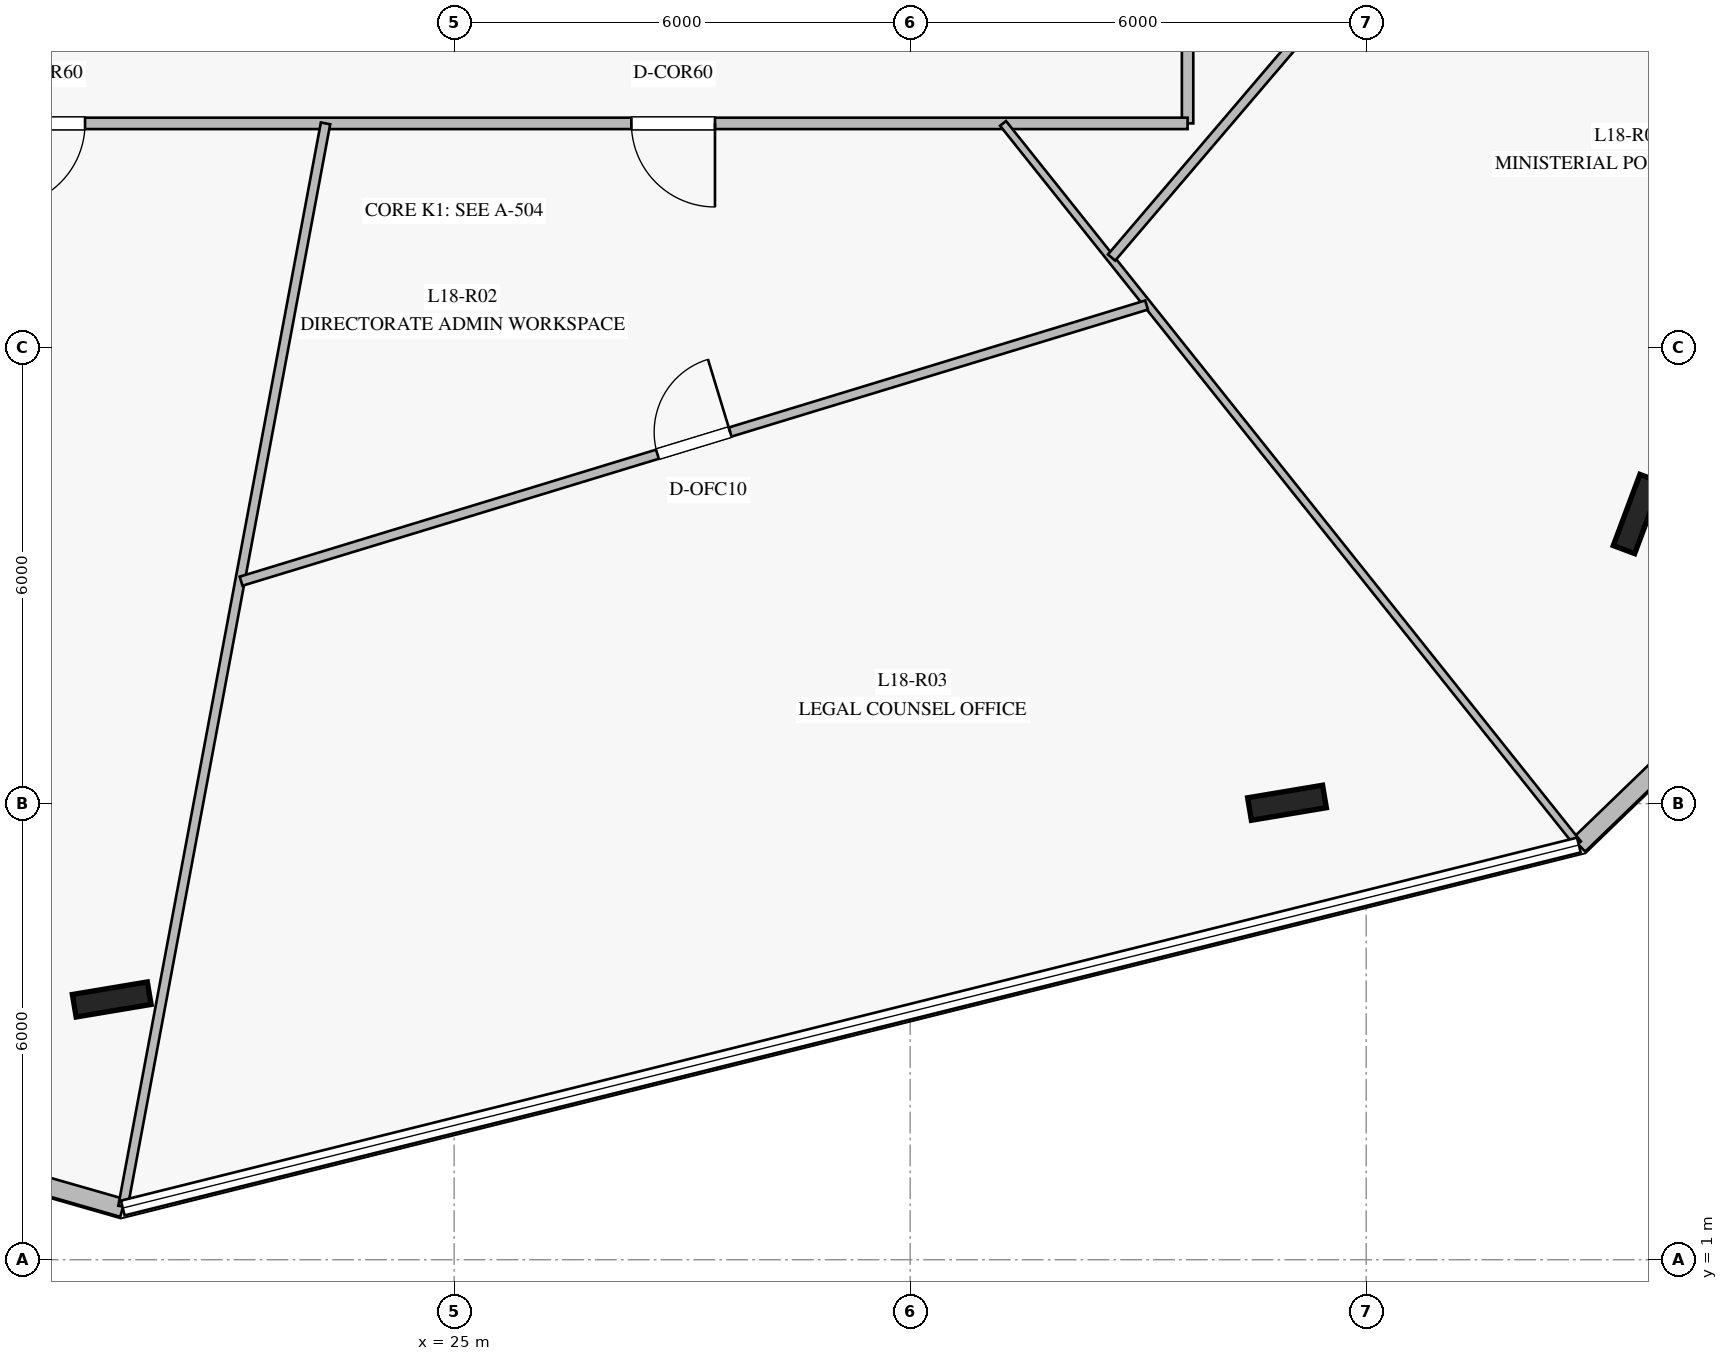
"""IFC4 building model, lengths in metres.
Left out: names, types, materials, properties, quantities, classifications, styles, units other than length and angle.
Written with IfcOpenShell. Run it as: python <this file> out.ifc"""

import sys

from ifc_helpers import new_model, si_unit, direction, frame, frame_2d, origin, origin_2d, place, context, subcontext, project, spatial, rectangle, i_section, extrude, element, fill, save


model = new_model("IFC4")
c1 = context("Model", 3, precision=1e-05, world=origin(), true_north=direction((0.0, 1.0)))
c2 = subcontext(c1, "Body", "Model", "MODEL_VIEW")
j1 = project(units=[si_unit("LENGTHUNIT", "METRE"), si_unit("PLANEANGLEUNIT", "RADIAN")], contexts=[c1])
p1 = place(None, origin())
s1 = spatial("IfcSite", under=j1, at=p1, CompositionType="ELEMENT")
p2 = place(p1, origin())
s2 = spatial("IfcBuilding", under=s1, at=p2, CompositionType="ELEMENT")
p3 = place(p2, frame((0.0, 0.0, 76.0)))
s3 = spatial("IfcBuildingStorey", under=s2, at=p3, CompositionType="ELEMENT", Elevation=76.0)
for number, where, z_axis, x_axis in (
    (1, (20.495, 4.424, 0.0), (0.0, 0.0, 1.0), (0.986, 0.165, 0.0)),
    (2, (35.958, 7.012, 0.0), (0.0, 0.0, 1.0), (0.986, 0.165, 0.0)),
    (3, (40.567, 10.811, 0.0), (0.0, 0.0, 1.0), (0.35, 0.937, 0.0)),
):
    element("IfcColumn", number, at=place(p3, frame(where, z_axis=z_axis, x_axis=x_axis)), inside=s3, PredefinedType="COLUMN", context=c2, shape_type="SweptSolid", body=[
        extrude(i_section(OverallWidth=0.3, OverallDepth=1.0, WebThickness=0.019, FlangeThickness=0.036, at=origin_2d()), origin(), (0.0, 0.0, 1.0), 4.0),
    ])
p4 = place(p3, frame((16.34, 2.913, 0.0), z_axis=(0.0, 0.0, 1.0), x_axis=(0.96124954367, -0.275679732289, 0.0)))
e4 = element("IfcWall", 4, at=p4, inside=s3, PredefinedType="STANDARD", context=c2, shape_type="SweptSolid", body=[
    extrude(rectangle(XDim=4.473, YDim=0.24, at=frame_2d((2.237, 0.0))), origin(), (0.0, 0.0, 1.0), 3.76),
])
p5 = place(p3, frame((39.798, 6.456, 0.0), z_axis=(0.0, 0.0, 1.0), x_axis=(0.719305542435, 0.694693843806, 0.0)))
e5 = element("IfcWall", 5, at=p5, inside=s3, PredefinedType="STANDARD", context=c2, shape_type="SweptSolid", body=[
    extrude(rectangle(XDim=4.474, YDim=0.24, at=frame_2d((2.237, 0.0))), origin(), (0.0, 0.0, 1.0), 3.76),
])
p6 = place(p3, frame((34.65, 34.05, 0.0), z_axis=(0.0, 0.0, 1.0), x_axis=(0.0, -1.0, 0.0)))
e6 = element("IfcWall", 6, at=p6, inside=s3, PredefinedType="PARTITIONING", context=c2, shape_type="SweptSolid", body=[
    extrude(rectangle(XDim=18.1, YDim=0.15, at=frame_2d((9.05, 0.0))), origin(), (0.0, 0.0, 1.0), 3.21),
])
p7 = place(p6, frame((13.106, 0.0, 0.0)))
e7 = element("IfcOpeningElement", 7, at=p7, cuts=e6, PredefinedType="OPENING", context=c2, shape_type="SweptSolid", body=[
    extrude(rectangle(XDim=1.1, YDim=2.2, at=frame_2d((0.55, 1.1))), frame((0.0, 0.085, 0.0), z_axis=(0.0, -1.0, 0.0), x_axis=(1.0, 0.0, 0.0)), (0.0, 0.0, 1.0), 0.17),
])
p8 = place(p3, frame((34.65, 15.95, 0.0), z_axis=(0.0, 0.0, 1.0), x_axis=(-1.0, 0.0, 0.0)))
e8 = element("IfcWall", 8, at=p8, inside=s3, PredefinedType="PARTITIONING", context=c2, shape_type="SweptSolid", body=[
    extrude(rectangle(XDim=19.3, YDim=0.15, at=frame_2d((9.65, 0.0))), origin(), (0.0, 0.0, 1.0), 3.21),
])
p9 = place(p8, frame((14.506, 0.0, 0.0)))
e9 = element("IfcOpeningElement", 9, at=p9, cuts=e8, PredefinedType="OPENING", context=c2, shape_type="SweptSolid", body=[
    extrude(rectangle(XDim=1.1, YDim=2.2, at=frame_2d((0.55, 1.1))), frame((0.0, 0.085, 0.0), z_axis=(0.0, -1.0, 0.0), x_axis=(1.0, 0.0, 0.0)), (0.0, 0.0, 1.0), 0.17),
])
p10 = place(p8, frame((6.218, 0.0, 0.0)))
e10 = element("IfcOpeningElement", 10, at=p10, cuts=e8, PredefinedType="OPENING", context=c2, shape_type="SweptSolid", body=[
    extrude(rectangle(XDim=1.1, YDim=2.2, at=frame_2d((0.55, 1.1))), frame((0.0, 0.085, 0.0), z_axis=(0.0, -1.0, 0.0), x_axis=(1.0, 0.0, 0.0)), (0.0, 0.0, 1.0), 0.17),
])
p11 = place(p3, frame((23.308, 15.95, 0.0), z_axis=(0.0, 0.0, 1.0), x_axis=(-0.183820818774, -0.982959768549, 0.0)))
e11 = element("IfcWall", 11, at=p11, inside=s3, PredefinedType="PARTITIONING", context=c2, shape_type="SweptSolid", body=[
    extrude(rectangle(XDim=14.498, YDim=0.125, at=frame_2d((7.249, 0.0))), origin(), (0.0, 0.0, 1.0), 3.06),
])
p12 = place(p3, frame((32.222, 15.95, 0.0), z_axis=(0.0, 0.0, 1.0), x_axis=(0.623766515339, -0.781610730698, 0.0)))
e12 = element("IfcWall", 12, at=p12, inside=s3, PredefinedType="MOVABLE", context=c2, shape_type="SweptSolid", body=[
    extrude(rectangle(XDim=12.126, YDim=0.1, at=frame_2d((6.063, 0.0))), origin(), (0.0, 0.0, 1.0), 3.06),
])
p13 = place(p3, frame((22.197, 9.927, 0.0), z_axis=(0.0, 0.0, 1.0), x_axis=(0.956509687219, 0.291700562659, 0.0)))
e13 = element("IfcWall", 13, at=p13, inside=s3, PredefinedType="PARTITIONING", context=c2, shape_type="SweptSolid", body=[
    extrude(rectangle(XDim=12.455, YDim=0.125, at=frame_2d((6.228, 0.0))), origin(), (0.0, 0.0, 1.0), 3.21),
])
p14 = place(p13, frame((5.727, 0.0, 0.0)))
e14 = element("IfcOpeningElement", 14, at=p14, cuts=e13, PredefinedType="OPENING", context=c2, shape_type="SweptSolid", body=[
    extrude(rectangle(XDim=1.0, YDim=2.15, at=frame_2d((0.5, 1.075))), frame((0.0, 0.073, 0.0), z_axis=(0.0, -1.0, 0.0), x_axis=(1.0, 0.0, 0.0)), (0.0, 0.0, 1.0), 0.145),
])
p15 = place(p3, frame((33.65, 14.185, 0.0), z_axis=(0.0, 0.0, 1.0), x_axis=(0.649124350688, 0.760682310392, 0.0)))
e15 = element("IfcWall", 15, at=p15, inside=s3, PredefinedType="PARTITIONING", context=c2, shape_type="SweptSolid", body=[
    extrude(rectangle(XDim=12.978, YDim=0.125, at=frame_2d((6.489, 0.0))), origin(), (0.0, 0.0, 1.0), 3.21),
])
p16 = place(p15, frame((5.899, 0.0, 0.0)))
e16 = element("IfcOpeningElement", 16, at=p16, cuts=e15, PredefinedType="OPENING", context=c2, shape_type="SweptSolid", body=[
    extrude(rectangle(XDim=1.0, YDim=2.15, at=frame_2d((0.5, 1.075))), frame((0.0, 0.073, 0.0), z_axis=(0.0, -1.0, 0.0), x_axis=(1.0, 0.0, 0.0)), (0.0, 0.0, 1.0), 0.145),
])
p17 = place(p9, origin())
e17 = element("IfcDoor", 17, at=p17, inside=s3, OperationType="SINGLE_SWING_RIGHT", PredefinedType="DOOR", context=c2, shape_type="SweptSolid", body=[
    extrude(rectangle(XDim=1.1, YDim=2.2, at=frame_2d((0.55, 1.1))), frame((0.0, 0.025, 0.0), z_axis=(0.0, -1.0, 0.0), x_axis=(1.0, 0.0, 0.0)), (0.0, 0.0, 1.0), 0.05),
])
fill(e9, e17)
p18 = place(p10, origin())
e18 = element("IfcDoor", 18, at=p18, inside=s3, OperationType="SINGLE_SWING_LEFT", PredefinedType="DOOR", context=c2, shape_type="SweptSolid", body=[
    extrude(rectangle(XDim=1.1, YDim=2.2, at=frame_2d((0.55, 1.1))), frame((0.0, 0.025, 0.0), z_axis=(0.0, -1.0, 0.0), x_axis=(1.0, 0.0, 0.0)), (0.0, 0.0, 1.0), 0.05),
])
fill(e10, e18)
p19 = place(p14, origin())
e19 = element("IfcDoor", 19, at=p19, inside=s3, OperationType="SINGLE_SWING_RIGHT", PredefinedType="DOOR", context=c2, shape_type="SweptSolid", body=[
    extrude(rectangle(XDim=1.0, YDim=2.15, at=frame_2d((0.5, 1.075))), frame((0.0, 0.025, 0.0), z_axis=(0.0, -1.0, 0.0), x_axis=(1.0, 0.0, 0.0)), (0.0, 0.0, 1.0), 0.05),
])
fill(e14, e19)
save(model, sys.argv[1])
